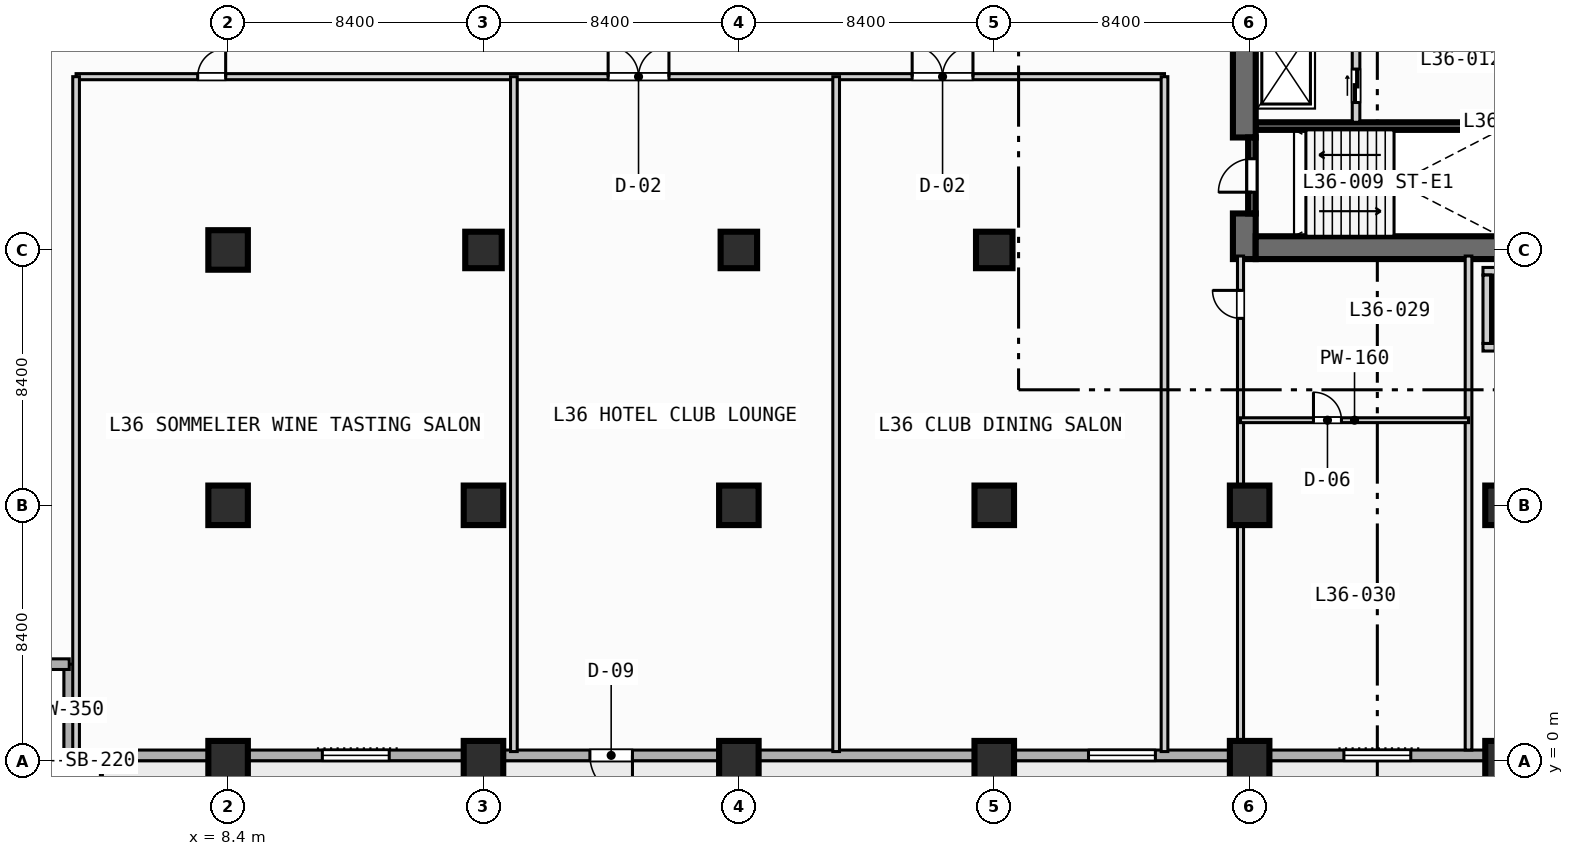
"""IFC4 building model, lengths in metres.
Left out: names, types, materials, properties, quantities, classifications, styles, units other than length and angle.
Written with IfcOpenShell. Run it as: python <this file> out.ifc"""

import sys

from ifc_helpers import new_model, si_unit, direction, frame, frame_2d, origin, origin_2d, place, context, subcontext, project, spatial, rectangle, extrude, element, fill, save


model = new_model("IFC4")
c1 = context("Model", 3, precision=1e-05, world=origin(), true_north=direction((0.0, 1.0)))
c2 = subcontext(c1, "Body", "Model", "MODEL_VIEW")
j1 = project(units=[si_unit("LENGTHUNIT", "METRE"), si_unit("PLANEANGLEUNIT", "RADIAN")], contexts=[c1])
p1 = place(None, origin())
s1 = spatial("IfcSite", under=j1, at=p1, CompositionType="ELEMENT")
p2 = place(p1, origin())
s2 = spatial("IfcBuilding", under=s1, at=p2, CompositionType="ELEMENT")
p3 = place(p2, frame((0.0, 0.0, 149.4)))
s3 = spatial("IfcBuildingStorey", under=s2, at=p3, CompositionType="ELEMENT", Elevation=149.4)
p4 = place(p3, frame((42.2, 20.875, 0.0), z_axis=(0.0, 0.0, 1.0), x_axis=(1.0, 0.0, 0.0)))
e1 = element("IfcWall", 1, at=p4, inside=s3, PredefinedType="SOLIDWALL", context=c2, shape_type="SweptSolid", body=[
    extrude(rectangle(XDim=8.05, YDim=0.25, at=frame_2d((4.025, 0.0))), origin(), (0.0, 0.0, 1.0), 3.55),
])
p5 = place(p3, frame((41.825, 16.5, 0.0), z_axis=(0.0, 0.0, 1.0), x_axis=(0.0, 1.0, 0.0)))
e2 = element("IfcWall", 2, at=p5, inside=s3, PredefinedType="SHEAR", context=c2, shape_type="SweptSolid", body=[
    extrude(rectangle(XDim=1.5, YDim=0.75, at=frame_2d((0.75, 0.0))), origin(), (0.0, 0.0, 1.0), 3.55),
])
p6 = place(p3, frame((41.825, 20.5, 0.0), z_axis=(0.0, 0.0, 1.0), x_axis=(0.0, 1.0, 0.0)))
e3 = element("IfcWall", 3, at=p6, inside=s3, PredefinedType="SHEAR", context=c2, shape_type="SweptSolid", body=[
    extrude(rectangle(XDim=5.075, YDim=0.75, at=frame_2d((2.538, 0.0))), origin(), (0.0, 0.0, 1.0), 3.55),
])
p7 = place(p3, frame((42.2, 16.875, 0.0), z_axis=(0.0, 0.0, 1.0), x_axis=(1.0, 0.0, 0.0)))
e4 = element("IfcWall", 4, at=p7, inside=s3, PredefinedType="SHEAR", context=c2, shape_type="SweptSolid", body=[
    extrude(rectangle(XDim=16.35, YDim=0.75, at=frame_2d((8.175, 0.0))), origin(), (0.0, 0.0, 1.0), 3.55),
])
for number, where, z_axis, x_axis in (
    (5, (8.4, 0.0, 0.0), (0.0, 0.0, 1.0), (1.0, 0.0, 0.0)),
    (6, (8.4, 8.4, 0.0), (0.0, 0.0, 1.0), (1.0, 0.0, 0.0)),
    (7, (8.4, 16.8, 0.0), (0.0, 0.0, 1.0), (1.0, 0.0, 0.0)),
    (8, (16.8, 0.0, 0.0), (0.0, 0.0, 1.0), (1.0, 0.0, 0.0)),
    (9, (16.8, 8.4, 0.0), (0.0, 0.0, 1.0), (1.0, 0.0, 0.0)),
):
    element("IfcColumn", number, at=place(p3, frame(where, z_axis=z_axis, x_axis=x_axis)), inside=s3, PredefinedType="COLUMN", context=c2, shape_type="SweptSolid", body=[
        extrude(rectangle(XDim=1.3, YDim=1.3, at=origin_2d()), origin(), (0.0, 0.0, 1.0), 3.8),
    ])
p8 = place(p3, frame((16.8, 16.8, 0.0), z_axis=(0.0, 0.0, 1.0), x_axis=(1.0, 0.0, 0.0)))
e10 = element("IfcColumn", 10, at=p8, inside=s3, PredefinedType="COLUMN", context=c2, shape_type="SweptSolid", body=[
    extrude(rectangle(XDim=1.2, YDim=1.2, at=origin_2d()), origin(), (0.0, 0.0, 1.0), 3.8),
])
for number, where, z_axis, x_axis in (
    (11, (25.2, 0.0, 0.0), (0.0, 0.0, 1.0), (1.0, 0.0, 0.0)),
    (12, (25.2, 8.4, 0.0), (0.0, 0.0, 1.0), (1.0, 0.0, 0.0)),
):
    element("IfcColumn", number, at=place(p3, frame(where, z_axis=z_axis, x_axis=x_axis)), inside=s3, PredefinedType="COLUMN", context=c2, shape_type="SweptSolid", body=[
        extrude(rectangle(XDim=1.3, YDim=1.3, at=origin_2d()), origin(), (0.0, 0.0, 1.0), 3.8),
    ])
p9 = place(p3, frame((25.2, 16.8, 0.0), z_axis=(0.0, 0.0, 1.0), x_axis=(1.0, 0.0, 0.0)))
e13 = element("IfcColumn", 13, at=p9, inside=s3, PredefinedType="COLUMN", context=c2, shape_type="SweptSolid", body=[
    extrude(rectangle(XDim=1.2, YDim=1.2, at=origin_2d()), origin(), (0.0, 0.0, 1.0), 3.8),
])
for number, where, z_axis, x_axis in (
    (14, (33.6, 0.0, 0.0), (0.0, 0.0, 1.0), (1.0, 0.0, 0.0)),
    (15, (33.6, 8.4, 0.0), (0.0, 0.0, 1.0), (1.0, 0.0, 0.0)),
):
    element("IfcColumn", number, at=place(p3, frame(where, z_axis=z_axis, x_axis=x_axis)), inside=s3, PredefinedType="COLUMN", context=c2, shape_type="SweptSolid", body=[
        extrude(rectangle(XDim=1.3, YDim=1.3, at=origin_2d()), origin(), (0.0, 0.0, 1.0), 3.8),
    ])
p10 = place(p3, frame((33.6, 16.8, 0.0), z_axis=(0.0, 0.0, 1.0), x_axis=(1.0, 0.0, 0.0)))
e16 = element("IfcColumn", 16, at=p10, inside=s3, PredefinedType="COLUMN", context=c2, shape_type="SweptSolid", body=[
    extrude(rectangle(XDim=1.2, YDim=1.2, at=origin_2d()), origin(), (0.0, 0.0, 1.0), 3.8),
])
for number, where, z_axis, x_axis in (
    (17, (42.0, 0.0, 0.0), (0.0, 0.0, 1.0), (1.0, 0.0, 0.0)),
    (18, (42.0, 8.4, 0.0), (0.0, 0.0, 1.0), (1.0, 0.0, 0.0)),
    (19, (50.4, 0.0, 0.0), (0.0, 0.0, 1.0), (1.0, 0.0, 0.0)),
    (20, (50.4, 8.4, 0.0), (0.0, 0.0, 1.0), (1.0, 0.0, 0.0)),
):
    element("IfcColumn", number, at=place(p3, frame(where, z_axis=z_axis, x_axis=x_axis)), inside=s3, PredefinedType="COLUMN", context=c2, shape_type="SweptSolid", body=[
        extrude(rectangle(XDim=1.3, YDim=1.3, at=origin_2d()), origin(), (0.0, 0.0, 1.0), 3.8),
    ])
for number, where, z_axis, x_axis in (
    (21, (3.175, 0.175, 0.0), (0.0, 0.0, 1.0), (0.0, 1.0, 0.0)),
    (22, (3.175, 3.175, 0.0), (0.0, 0.0, 1.0), (-1.0, 0.0, 0.0)),
):
    element("IfcWall", number, at=place(p3, frame(where, z_axis=z_axis, x_axis=x_axis)), inside=s3, PredefinedType="STANDARD", context=c2, shape_type="SweptSolid", body=[
        extrude(rectangle(XDim=3.0, YDim=0.35, at=frame_2d((1.5, 0.0))), origin(), (0.0, 0.0, 1.0), 3.55),
    ])
p11 = place(p3, frame((72.425, 0.175, 0.0), z_axis=(0.0, 0.0, 1.0), x_axis=(-1.0, 0.0, 0.0)))
e23 = element("IfcWall", 23, at=p11, inside=s3, PredefinedType="STANDARD", context=c2, shape_type="SweptSolid", body=[
    extrude(rectangle(XDim=69.25, YDim=0.35, at=frame_2d((34.625, 0.0))), origin(), (0.0, 0.0, 1.0), 3.55),
])
p12 = place(p11, frame((50.725, 0.0, 0.0)))
e24 = element("IfcOpeningElement", 24, at=p12, cuts=e23, PredefinedType="OPENING", context=c2, shape_type="SweptSolid", body=[
    extrude(rectangle(XDim=1.4, YDim=2.2, at=frame_2d((0.7, 1.1))), frame((0.0, 0.185, 0.0), z_axis=(0.0, -1.0, 0.0), x_axis=(1.0, 0.0, 0.0)), (0.0, 0.0, 1.0), 0.37),
])
p13 = place(p11, frame((58.725, 0.0, 0.85)))
e25 = element("IfcOpeningElement", 25, at=p13, cuts=e23, PredefinedType="OPENING", context=c2, shape_type="SweptSolid", body=[
    extrude(rectangle(XDim=2.2, YDim=1.8, at=frame_2d((1.1, 0.9))), frame((0.0, 0.185, 0.0), z_axis=(0.0, -1.0, 0.0), x_axis=(1.0, 0.0, 0.0)), (0.0, 0.0, 1.0), 0.37),
])
p14 = place(p11, frame((33.525, 0.0, 0.85)))
e26 = element("IfcOpeningElement", 26, at=p14, cuts=e23, PredefinedType="OPENING", context=c2, shape_type="SweptSolid", body=[
    extrude(rectangle(XDim=2.2, YDim=1.8, at=frame_2d((1.1, 0.9))), frame((0.0, 0.185, 0.0), z_axis=(0.0, -1.0, 0.0), x_axis=(1.0, 0.0, 0.0)), (0.0, 0.0, 1.0), 0.37),
])
p15 = place(p11, frame((25.125, 0.0, 0.85)))
e27 = element("IfcOpeningElement", 27, at=p15, cuts=e23, PredefinedType="OPENING", context=c2, shape_type="SweptSolid", body=[
    extrude(rectangle(XDim=2.2, YDim=1.8, at=frame_2d((1.1, 0.9))), frame((0.0, 0.185, 0.0), z_axis=(0.0, -1.0, 0.0), x_axis=(1.0, 0.0, 0.0)), (0.0, 0.0, 1.0), 0.37),
])
p16 = place(p11, frame((8.325, 0.0, 0.85)))
e28 = element("IfcOpeningElement", 28, at=p16, cuts=e23, PredefinedType="OPENING", context=c2, shape_type="SweptSolid", body=[
    extrude(rectangle(XDim=2.2, YDim=1.8, at=frame_2d((1.1, 0.9))), frame((0.0, 0.185, 0.0), z_axis=(0.0, -1.0, 0.0), x_axis=(1.0, 0.0, 0.0)), (0.0, 0.0, 1.0), 0.37),
])
p17 = place(p11, frame((2.125, 0.0, 0.85)))
e29 = element("IfcOpeningElement", 29, at=p17, cuts=e23, PredefinedType="OPENING", context=c2, shape_type="SweptSolid", body=[
    extrude(rectangle(XDim=1.8, YDim=1.8, at=frame_2d((0.9, 0.9))), frame((0.0, 0.185, 0.0), z_axis=(0.0, -1.0, 0.0), x_axis=(1.0, 0.0, 0.0)), (0.0, 0.0, 1.0), 0.37),
])
p18 = place(p3, frame((42.075, 18.0, 0.0), z_axis=(0.0, 0.0, 1.0), x_axis=(0.0, 1.0, 0.0)))
e30 = element("IfcWall", 30, at=p18, inside=s3, PredefinedType="SOLIDWALL", context=c2, shape_type="SweptSolid", body=[
    extrude(rectangle(XDim=2.5, YDim=0.25, at=frame_2d((1.25, 0.0))), origin(), (0.0, 0.0, 1.0), 3.55),
])
p19 = place(p18, frame((0.7, 0.0, 0.0)))
e31 = element("IfcOpeningElement", 31, at=p19, cuts=e30, PredefinedType="OPENING", context=c2, shape_type="SweptSolid", body=[
    extrude(rectangle(XDim=1.1, YDim=2.15, at=frame_2d((0.55, 1.075))), frame((0.0, 0.135, 0.0), z_axis=(0.0, -1.0, 0.0), x_axis=(1.0, 0.0, 0.0)), (0.0, 0.0, 1.0), 0.27),
])
p20 = place(p3, frame((45.5, 21.0, 0.0), z_axis=(0.0, 0.0, 1.0), x_axis=(0.0, 1.0, 0.0)))
e32 = element("IfcWall", 32, at=p20, inside=s3, PredefinedType="SOLIDWALL", context=c2, shape_type="SweptSolid", body=[
    extrude(rectangle(XDim=4.15, YDim=0.25, at=frame_2d((2.075, 0.0))), origin(), (0.0, 0.0, 1.0), 3.55),
])
p21 = place(p20, frame((0.65, 0.0, 0.0)))
e33 = element("IfcOpeningElement", 33, at=p21, cuts=e32, PredefinedType="OPENING", context=c2, shape_type="SweptSolid", body=[
    extrude(rectangle(XDim=1.1, YDim=2.15, at=frame_2d((0.55, 1.075))), frame((0.0, 0.135, 0.0), z_axis=(0.0, -1.0, 0.0), x_axis=(1.0, 0.0, 0.0)), (0.0, 0.0, 1.0), 0.27),
])
p22 = place(p3, frame((49.675, 13.6, 0.0), z_axis=(0.0, 0.0, 1.0), x_axis=(1.0, 0.0, 0.0)))
e34 = element("IfcWall", 34, at=p22, inside=s3, PredefinedType="SOLIDWALL", context=c2, shape_type="SweptSolid", body=[
    extrude(rectangle(XDim=2.25, YDim=0.25, at=frame_2d((1.125, 0.0))), origin(), (0.0, 0.0, 1.0), 3.55),
])
p23 = place(p22, frame((0.4, 0.0, 0.0)))
e35 = element("IfcOpeningElement", 35, at=p23, cuts=e34, PredefinedType="OPENING", context=c2, shape_type="SweptSolid", body=[
    extrude(rectangle(XDim=1.1, YDim=2.15, at=frame_2d((0.55, 1.075))), frame((0.0, 0.135, 0.0), z_axis=(0.0, -1.0, 0.0), x_axis=(1.0, 0.0, 0.0)), (0.0, 0.0, 1.0), 0.27),
])
for number, where, z_axis, x_axis in (
    (36, (49.675, 16.1, 0.0), (0.0, 0.0, 1.0), (1.0, 0.0, 0.0)),
    (37, (49.8, 13.725, 0.0), (0.0, 0.0, 1.0), (0.0, 1.0, 0.0)),
):
    element("IfcWall", number, at=place(p3, frame(where, z_axis=z_axis, x_axis=x_axis)), inside=s3, PredefinedType="SOLIDWALL", context=c2, shape_type="SweptSolid", body=[
        extrude(rectangle(XDim=2.25, YDim=0.25, at=frame_2d((1.125, 0.0))), origin(), (0.0, 0.0, 1.0), 3.55),
    ])
p24 = place(p3, frame((41.7, 0.35, 0.0), z_axis=(0.0, 0.0, 1.0), x_axis=(0.0, 1.0, 0.0)))
e38 = element("IfcWall", 38, at=p24, inside=s3, PredefinedType="PARTITIONING", context=c2, shape_type="SweptSolid", body=[
    extrude(rectangle(XDim=16.25, YDim=0.2, at=frame_2d((8.125, 0.0))), origin(), (0.0, 0.0, 1.0), 2.9),
])
p25 = place(p24, frame((14.2, 0.0, 0.0)))
e39 = element("IfcOpeningElement", 39, at=p25, cuts=e38, PredefinedType="OPENING", context=c2, shape_type="SweptSolid", body=[
    extrude(rectangle(XDim=0.92, YDim=2.1, at=frame_2d((0.46, 1.05))), frame((0.0, 0.11, 0.0), z_axis=(0.0, -1.0, 0.0), x_axis=(1.0, 0.0, 0.0)), (0.0, 0.0, 1.0), 0.22),
])
p26 = place(p3, frame((49.2, 0.35, 0.0), z_axis=(0.0, 0.0, 1.0), x_axis=(0.0, 1.0, 0.0)))
e40 = element("IfcWall", 40, at=p26, inside=s3, PredefinedType="PARTITIONING", context=c2, shape_type="SweptSolid", body=[
    extrude(rectangle(XDim=16.25, YDim=0.22, at=frame_2d((8.125, 0.0))), origin(), (0.0, 0.0, 1.0), 3.55),
])
p27 = place(p3, frame((41.7, 11.2, 0.0), z_axis=(0.0, 0.0, 1.0), x_axis=(1.0, 0.0, 0.0)))
e41 = element("IfcWall", 41, at=p27, inside=s3, PredefinedType="PARTITIONING", context=c2, shape_type="SweptSolid", body=[
    extrude(rectangle(XDim=7.5, YDim=0.16, at=frame_2d((3.75, 0.0))), origin(), (0.0, 0.0, 1.0), 3.55),
])
p28 = place(p27, frame((2.4, 0.0, 0.0)))
e42 = element("IfcOpeningElement", 42, at=p28, cuts=e41, PredefinedType="OPENING", context=c2, shape_type="SweptSolid", body=[
    extrude(rectangle(XDim=0.92, YDim=2.1, at=frame_2d((0.46, 1.05))), frame((0.0, 0.09, 0.0), z_axis=(0.0, -1.0, 0.0), x_axis=(1.0, 0.0, 0.0)), (0.0, 0.0, 1.0), 0.18),
])
p29 = place(p3, frame((3.4, 22.5, 0.0), z_axis=(0.0, 0.0, 1.0), x_axis=(1.0, 0.0, 0.0)))
e43 = element("IfcWall", 43, at=p29, inside=s3, PredefinedType="PARTITIONING", context=c2, shape_type="SweptSolid", body=[
    extrude(rectangle(XDim=35.8, YDim=0.2, at=frame_2d((17.9, 0.0))), origin(), (0.0, 0.0, 1.0), 3.55),
])
p30 = place(p29, frame((4.0, 0.0, 0.0)))
e44 = element("IfcOpeningElement", 44, at=p30, cuts=e43, PredefinedType="OPENING", context=c2, shape_type="SweptSolid", body=[
    extrude(rectangle(XDim=0.92, YDim=2.1, at=frame_2d((0.46, 1.05))), frame((0.0, 0.11, 0.0), z_axis=(0.0, -1.0, 0.0), x_axis=(1.0, 0.0, 0.0)), (0.0, 0.0, 1.0), 0.22),
])
p31 = place(p29, frame((17.5, 0.0, 0.0)))
e45 = element("IfcOpeningElement", 45, at=p31, cuts=e43, PredefinedType="OPENING", context=c2, shape_type="SweptSolid", body=[
    extrude(rectangle(XDim=2.0, YDim=2.15, at=frame_2d((1.0, 1.075))), frame((0.0, 0.11, 0.0), z_axis=(0.0, -1.0, 0.0), x_axis=(1.0, 0.0, 0.0)), (0.0, 0.0, 1.0), 0.22),
])
p32 = place(p29, frame((27.5, 0.0, 0.0)))
e46 = element("IfcOpeningElement", 46, at=p32, cuts=e43, PredefinedType="OPENING", context=c2, shape_type="SweptSolid", body=[
    extrude(rectangle(XDim=2.0, YDim=2.15, at=frame_2d((1.0, 1.075))), frame((0.0, 0.11, 0.0), z_axis=(0.0, -1.0, 0.0), x_axis=(1.0, 0.0, 0.0)), (0.0, 0.0, 1.0), 0.22),
])
for number, where, z_axis, x_axis in (
    (47, (3.4, 0.3, 0.0), (0.0, 0.0, 1.0), (0.0, 1.0, 0.0)),
    (48, (17.8, 0.3, 0.0), (0.0, 0.0, 1.0), (0.0, 1.0, 0.0)),
    (49, (28.4, 0.3, 0.0), (0.0, 0.0, 1.0), (0.0, 1.0, 0.0)),
    (50, (39.2, 0.3, 0.0), (0.0, 0.0, 1.0), (0.0, 1.0, 0.0)),
):
    element("IfcWall", number, at=place(p3, frame(where, z_axis=z_axis, x_axis=x_axis)), inside=s3, PredefinedType="PARTITIONING", context=c2, shape_type="SweptSolid", body=[
        extrude(rectangle(XDim=22.2, YDim=0.22, at=frame_2d((11.1, 0.0))), origin(), (0.0, 0.0, 1.0), 3.55),
    ])
p33 = place(p12, origin())
e51 = element("IfcDoor", 51, at=p33, inside=s3, OperationType="SINGLE_SWING_LEFT", PredefinedType="DOOR", context=c2, shape_type="SweptSolid", body=[
    extrude(rectangle(XDim=1.4, YDim=2.2, at=frame_2d((0.7, 1.1))), frame((0.0, 0.025, 0.0), z_axis=(0.0, -1.0, 0.0), x_axis=(1.0, 0.0, 0.0)), (0.0, 0.0, 1.0), 0.05),
])
fill(e24, e51)
p34 = place(p13, origin())
e52 = element("IfcWindow", 52, at=p34, inside=s3, PartitioningType="SINGLE_PANEL", PredefinedType="WINDOW", context=c2, shape_type="SweptSolid", body=[
    extrude(rectangle(XDim=2.2, YDim=1.8, at=frame_2d((1.1, 0.9))), frame((0.0, 0.03, 0.0), z_axis=(0.0, -1.0, 0.0), x_axis=(1.0, 0.0, 0.0)), (0.0, 0.0, 1.0), 0.06),
])
fill(e25, e52)
p35 = place(p14, origin())
e53 = element("IfcWindow", 53, at=p35, inside=s3, PartitioningType="SINGLE_PANEL", PredefinedType="WINDOW", context=c2, shape_type="SweptSolid", body=[
    extrude(rectangle(XDim=2.2, YDim=1.8, at=frame_2d((1.1, 0.9))), frame((0.0, 0.03, 0.0), z_axis=(0.0, -1.0, 0.0), x_axis=(1.0, 0.0, 0.0)), (0.0, 0.0, 1.0), 0.06),
])
fill(e26, e53)
p36 = place(p15, origin())
e54 = element("IfcWindow", 54, at=p36, inside=s3, PartitioningType="SINGLE_PANEL", PredefinedType="WINDOW", context=c2, shape_type="SweptSolid", body=[
    extrude(rectangle(XDim=2.2, YDim=1.8, at=frame_2d((1.1, 0.9))), frame((0.0, 0.03, 0.0), z_axis=(0.0, -1.0, 0.0), x_axis=(1.0, 0.0, 0.0)), (0.0, 0.0, 1.0), 0.06),
])
fill(e27, e54)
p37 = place(p19, origin())
e55 = element("IfcDoor", 55, at=p37, inside=s3, OperationType="SINGLE_SWING_LEFT", PredefinedType="DOOR", context=c2, shape_type="SweptSolid", body=[
    extrude(rectangle(XDim=1.1, YDim=2.15, at=frame_2d((0.55, 1.075))), frame((0.0, 0.025, 0.0), z_axis=(0.0, -1.0, 0.0), x_axis=(1.0, 0.0, 0.0)), (0.0, 0.0, 1.0), 0.05),
])
fill(e31, e55)
p38 = place(p21, origin())
e56 = element("IfcDoor", 56, at=p38, inside=s3, OperationType="SLIDING_TO_LEFT", PredefinedType="DOOR", context=c2, shape_type="SweptSolid", body=[
    extrude(rectangle(XDim=1.1, YDim=2.15, at=frame_2d((0.55, 1.075))), frame((0.0, 0.025, 0.0), z_axis=(0.0, -1.0, 0.0), x_axis=(1.0, 0.0, 0.0)), (0.0, 0.0, 1.0), 0.05),
])
fill(e33, e56)
p39 = place(p25, origin())
e57 = element("IfcDoor", 57, at=p39, inside=s3, OperationType="SINGLE_SWING_RIGHT", PredefinedType="DOOR", context=c2, shape_type="SweptSolid", body=[
    extrude(rectangle(XDim=0.92, YDim=2.1, at=frame_2d((0.46, 1.05))), frame((0.0, 0.025, 0.0), z_axis=(0.0, -1.0, 0.0), x_axis=(1.0, 0.0, 0.0)), (0.0, 0.0, 1.0), 0.05),
])
fill(e39, e57)
p40 = place(p28, origin())
e58 = element("IfcDoor", 58, at=p40, inside=s3, OperationType="SINGLE_SWING_LEFT", PredefinedType="DOOR", context=c2, shape_type="SweptSolid", body=[
    extrude(rectangle(XDim=0.92, YDim=2.1, at=frame_2d((0.46, 1.05))), frame((0.0, 0.025, 0.0), z_axis=(0.0, -1.0, 0.0), x_axis=(1.0, 0.0, 0.0)), (0.0, 0.0, 1.0), 0.05),
])
fill(e42, e58)
p41 = place(p30, origin())
e59 = element("IfcDoor", 59, at=p41, inside=s3, OperationType="SINGLE_SWING_RIGHT", PredefinedType="DOOR", context=c2, shape_type="SweptSolid", body=[
    extrude(rectangle(XDim=0.92, YDim=2.1, at=frame_2d((0.46, 1.05))), frame((0.0, 0.025, 0.0), z_axis=(0.0, -1.0, 0.0), x_axis=(1.0, 0.0, 0.0)), (0.0, 0.0, 1.0), 0.05),
])
fill(e44, e59)
p42 = place(p31, origin())
e60 = element("IfcDoor", 60, at=p42, inside=s3, OperationType="SINGLE_SWING_LEFT", PredefinedType="DOOR", context=c2, shape_type="SweptSolid", body=[
    extrude(rectangle(XDim=2.0, YDim=2.15, at=frame_2d((1.0, 1.075))), frame((0.0, 0.025, 0.0), z_axis=(0.0, -1.0, 0.0), x_axis=(1.0, 0.0, 0.0)), (0.0, 0.0, 1.0), 0.05),
])
fill(e45, e60)
p43 = place(p32, origin())
e61 = element("IfcDoor", 61, at=p43, inside=s3, OperationType="SINGLE_SWING_LEFT", PredefinedType="DOOR", context=c2, shape_type="SweptSolid", body=[
    extrude(rectangle(XDim=2.0, YDim=2.15, at=frame_2d((1.0, 1.075))), frame((0.0, 0.025, 0.0), z_axis=(0.0, -1.0, 0.0), x_axis=(1.0, 0.0, 0.0)), (0.0, 0.0, 1.0), 0.05),
])
fill(e46, e61)
save(model, sys.argv[1])
